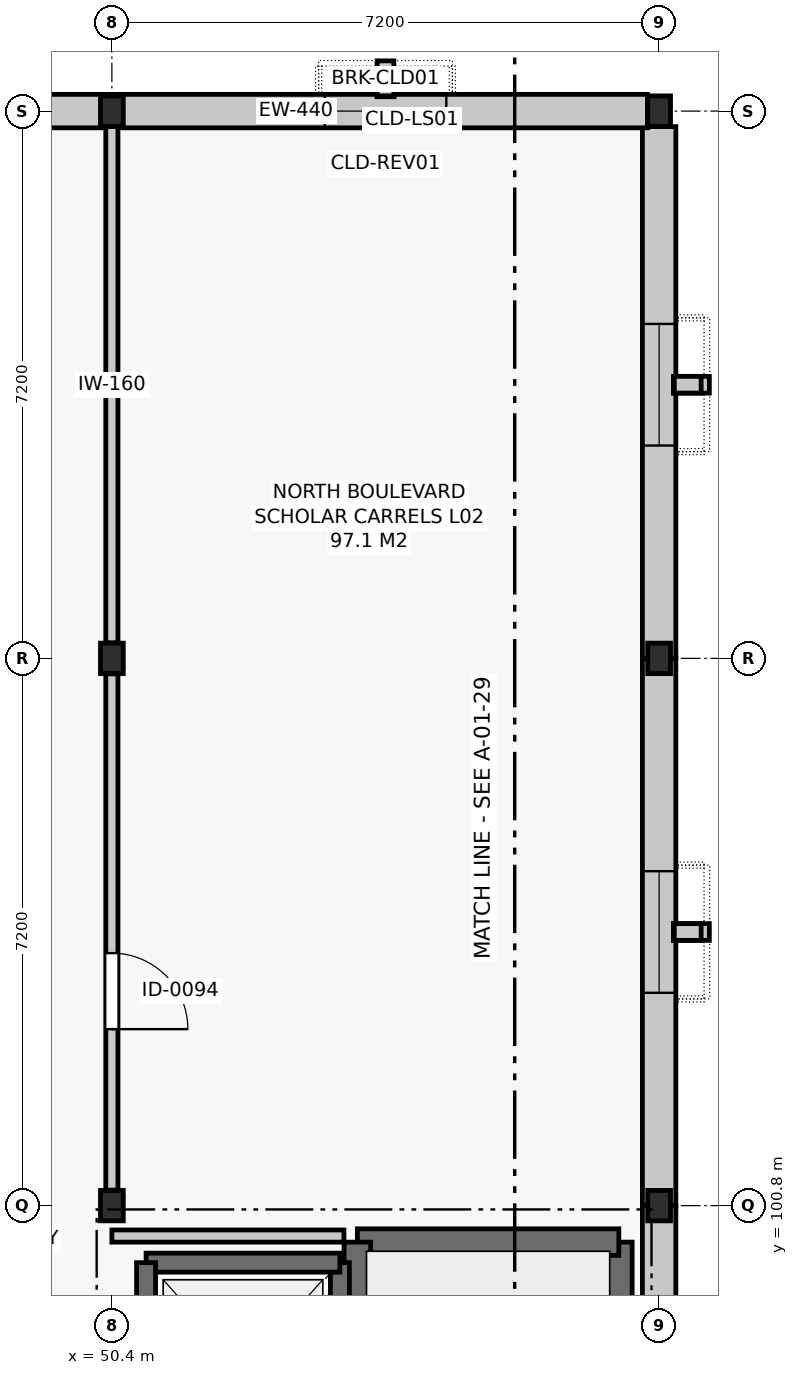
"""IFC4 building model, lengths in metres.
Left out: names, types, materials, properties, quantities, classifications, styles, units other than length and angle.
Written with IfcOpenShell. Run it as: python <this file> out.ifc"""

import sys

from ifc_helpers import new_model, si_unit, direction, frame, frame_2d, origin, origin_2d, place, context, subcontext, project, spatial, rectangle, i_section, extrude, element, fill, save


model = new_model("IFC4")
c1 = context("Model", 3, precision=1e-05, world=origin(), true_north=direction((0.0, 1.0)))
c2 = subcontext(c1, "Body", "Model", "MODEL_VIEW")
j1 = project(units=[si_unit("LENGTHUNIT", "METRE"), si_unit("PLANEANGLEUNIT", "RADIAN")], contexts=[c1])
p1 = place(None, origin())
s1 = spatial("IfcSite", under=j1, at=p1, CompositionType="ELEMENT")
p2 = place(p1, origin())
s2 = spatial("IfcBuilding", under=s1, at=p2, CompositionType="ELEMENT")
p3 = place(p2, frame((0.0, 0.0, 10.2)))
s3 = spatial("IfcBuildingStorey", under=s2, at=p3, CompositionType="ELEMENT", Elevation=10.2)
for number, where, z_axis, x_axis in (
    (1, (50.4, 100.8, 0.0), (0.0, 0.0, 1.0), (1.0, 0.0, 0.0)),
    (2, (50.4, 108.0, 0.0), (0.0, 0.0, 1.0), (1.0, 0.0, 0.0)),
    (3, (50.4, 115.2, 0.0), (0.0, 0.0, 1.0), (1.0, 0.0, 0.0)),
    (4, (57.6, 100.8, 0.0), (0.0, 0.0, 1.0), (1.0, 0.0, 0.0)),
    (5, (57.6, 108.0, 0.0), (0.0, 0.0, 1.0), (1.0, 0.0, 0.0)),
    (6, (57.6, 115.2, 0.0), (0.0, 0.0, 1.0), (1.0, 0.0, 0.0)),
):
    element("IfcColumn", number, at=place(p3, frame(where, z_axis=z_axis, x_axis=x_axis)), inside=s3, PredefinedType="COLUMN", context=c2, shape_type="SweptSolid", body=[
        extrude(i_section(OverallWidth=0.3, OverallDepth=0.4, WebThickness=0.013, FlangeThickness=0.024, FilletRadius=0.027, at=origin_2d()), origin(), (0.0, 0.0, 1.0), 4.2),
    ])
p4 = place(p3, frame((57.6, 93.6, 0.0), z_axis=(0.0, 0.0, 1.0), x_axis=(0.0, 1.0, 0.0)))
e7 = element("IfcWall", 7, at=p4, inside=s3, PredefinedType="SOLIDWALL", context=c2, shape_type="SweptSolid", body=[
    extrude(rectangle(XDim=7.2, YDim=0.44, at=frame_2d((3.6, 0.0))), origin(), (0.0, 0.0, 1.0), 3.2),
])
p5 = place(p4, frame((2.8, 0.0, 0.92)))
e8 = element("IfcOpeningElement", 8, at=p5, cuts=e7, PredefinedType="OPENING", context=c2, shape_type="SweptSolid", body=[
    extrude(rectangle(XDim=1.6, YDim=2.2, at=frame_2d((0.8, 1.1))), frame((0.0, 0.232, 0.0), z_axis=(0.0, -1.0, 0.0), x_axis=(1.0, 0.0, 0.0)), (0.0, 0.0, 1.0), 0.464),
])
p6 = place(p3, frame((57.6, 100.8, 0.0), z_axis=(0.0, 0.0, 1.0), x_axis=(0.0, 1.0, 0.0)))
e9 = element("IfcWall", 9, at=p6, inside=s3, PredefinedType="SOLIDWALL", context=c2, shape_type="SweptSolid", body=[
    extrude(rectangle(XDim=7.2, YDim=0.44, at=frame_2d((3.6, 0.0))), origin(), (0.0, 0.0, 1.0), 3.2),
])
p7 = place(p6, frame((2.8, 0.0, 0.92)))
e10 = element("IfcOpeningElement", 10, at=p7, cuts=e9, PredefinedType="OPENING", context=c2, shape_type="SweptSolid", body=[
    extrude(rectangle(XDim=1.6, YDim=2.2, at=frame_2d((0.8, 1.1))), frame((0.0, 0.232, 0.0), z_axis=(0.0, -1.0, 0.0), x_axis=(1.0, 0.0, 0.0)), (0.0, 0.0, 1.0), 0.464),
])
p8 = place(p3, frame((57.6, 108.0, 0.0), z_axis=(0.0, 0.0, 1.0), x_axis=(0.0, 1.0, 0.0)))
e11 = element("IfcWall", 11, at=p8, inside=s3, PredefinedType="SOLIDWALL", context=c2, shape_type="SweptSolid", body=[
    extrude(rectangle(XDim=6.996, YDim=0.44, at=frame_2d((3.498, 0.0))), origin(), (0.0, 0.0, 1.0), 3.2),
])
p9 = place(p8, frame((2.8, 0.0, 0.92)))
e12 = element("IfcOpeningElement", 12, at=p9, cuts=e11, PredefinedType="OPENING", context=c2, shape_type="SweptSolid", body=[
    extrude(rectangle(XDim=1.6, YDim=2.2, at=frame_2d((0.8, 1.1))), frame((0.0, 0.232, 0.0), z_axis=(0.0, -1.0, 0.0), x_axis=(1.0, 0.0, 0.0)), (0.0, 0.0, 1.0), 0.464),
])
p10 = place(p3, frame((57.446, 115.2, 0.0), z_axis=(0.0, 0.0, 1.0), x_axis=(-1.0, 0.0, 0.0)))
e13 = element("IfcWall", 13, at=p10, inside=s3, PredefinedType="SOLIDWALL", context=c2, shape_type="SweptSolid", body=[
    extrude(rectangle(XDim=7.046, YDim=0.44, at=frame_2d((3.523, 0.0))), origin(), (0.0, 0.0, 1.0), 3.2),
])
p11 = place(p10, frame((2.646, 0.0, 0.92)))
e14 = element("IfcOpeningElement", 14, at=p11, cuts=e13, PredefinedType="OPENING", context=c2, shape_type="SweptSolid", body=[
    extrude(rectangle(XDim=1.6, YDim=2.2, at=frame_2d((0.8, 1.1))), frame((0.0, 0.232, 0.0), z_axis=(0.0, -1.0, 0.0), x_axis=(1.0, 0.0, 0.0)), (0.0, 0.0, 1.0), 0.464),
])
p12 = place(p3, frame((50.4, 115.2, 0.0), z_axis=(0.0, 0.0, 1.0), x_axis=(-1.0, 0.0, 0.0)))
e15 = element("IfcWall", 15, at=p12, inside=s3, PredefinedType="SOLIDWALL", context=c2, shape_type="SweptSolid", body=[
    extrude(rectangle(XDim=7.2, YDim=0.44, at=frame_2d((3.6, 0.0))), origin(), (0.0, 0.0, 1.0), 3.2),
])
p13 = place(p3, frame((57.07, 93.18, 0.0), z_axis=(0.0, 0.0, 1.0), x_axis=(0.0, 1.0, 0.0)))
e16 = element("IfcWall", 16, at=p13, inside=s3, PredefinedType="SHEAR", context=c2, shape_type="SweptSolid", body=[
    extrude(rectangle(XDim=7.14, YDim=0.35, at=frame_2d((3.57, 0.0))), origin(), (0.0, 0.0, 1.0), 3.92),
])
p14 = place(p3, frame((57.07, 100.32, 0.0), z_axis=(0.0, 0.0, 1.0), x_axis=(-1.0, 0.0, 0.0)))
e17 = element("IfcWall", 17, at=p14, inside=s3, PredefinedType="SHEAR", context=c2, shape_type="SweptSolid", body=[
    extrude(rectangle(XDim=3.44, YDim=0.35, at=frame_2d((1.72, 0.0))), origin(), (0.0, 0.0, 1.0), 3.92),
])
p15 = place(p3, frame((53.63, 100.32, 0.0), z_axis=(0.0, 0.0, 1.0), x_axis=(0.0, -1.0, 0.0)))
e18 = element("IfcWall", 18, at=p15, inside=s3, PredefinedType="SHEAR", context=c2, shape_type="SweptSolid", body=[
    extrude(rectangle(XDim=7.14, YDim=0.35, at=frame_2d((3.57, 0.0))), origin(), (0.0, 0.0, 1.0), 3.92),
])
p16 = place(p3, frame((53.4, 97.25, 0.0), z_axis=(0.0, 0.0, 1.0), x_axis=(0.0, 1.0, 0.0)))
e19 = element("IfcWall", 19, at=p16, inside=s3, PredefinedType="SHEAR", context=c2, shape_type="SweptSolid", body=[
    extrude(rectangle(XDim=2.8, YDim=0.25, at=frame_2d((1.4, 0.0))), origin(), (0.0, 0.0, 1.0), 3.92),
])
p17 = place(p3, frame((53.4, 100.05, 0.0), z_axis=(0.0, 0.0, 1.0), x_axis=(-1.0, 0.0, 0.0)))
e20 = element("IfcWall", 20, at=p17, inside=s3, PredefinedType="SHEAR", context=c2, shape_type="SweptSolid", body=[
    extrude(rectangle(XDim=2.55, YDim=0.25, at=frame_2d((1.275, 0.0))), origin(), (0.0, 0.0, 1.0), 3.92),
])
p18 = place(p3, frame((50.85, 100.05, 0.0), z_axis=(0.0, 0.0, 1.0), x_axis=(0.0, -1.0, 0.0)))
e21 = element("IfcWall", 21, at=p18, inside=s3, PredefinedType="SHEAR", context=c2, shape_type="SweptSolid", body=[
    extrude(rectangle(XDim=2.8, YDim=0.25, at=frame_2d((1.4, 0.0))), origin(), (0.0, 0.0, 1.0), 3.92),
])
p19 = place(p3, frame((50.4, 100.4, 0.0), z_axis=(0.0, 0.0, 1.0), x_axis=(1.0, 0.0, 0.0)))
e22 = element("IfcWall", 22, at=p19, inside=s3, PredefinedType="PARTITIONING", context=c2, shape_type="SweptSolid", body=[
    extrude(rectangle(XDim=3.053, YDim=0.16, at=frame_2d((1.526, 0.0))), origin(), (0.0, 0.0, 1.0), 3.555),
])
p20 = place(p3, frame((50.4, 101.004, 0.0), z_axis=(0.0, 0.0, 1.0), x_axis=(0.0, 1.0, 0.0)))
e23 = element("IfcWall", 23, at=p20, inside=s3, PredefinedType="PARTITIONING", context=c2, shape_type="SweptSolid", body=[
    extrude(rectangle(XDim=6.792, YDim=0.16, at=frame_2d((3.396, 0.0))), origin(), (0.0, 0.0, 1.0), 3.555),
])
p21 = place(p20, frame((2.118, 0.0, 0.0)))
e24 = element("IfcOpeningElement", 24, at=p21, cuts=e23, PredefinedType="OPENING", context=c2, shape_type="SweptSolid", body=[
    extrude(rectangle(XDim=1.0, YDim=2.15, at=frame_2d((0.5, 1.075))), frame((0.0, 0.092, 0.0), z_axis=(0.0, -1.0, 0.0), x_axis=(1.0, 0.0, 0.0)), (0.0, 0.0, 1.0), 0.184),
])
p22 = place(p3, frame((50.4, 108.204, 0.0), z_axis=(0.0, 0.0, 1.0), x_axis=(0.0, 1.0, 0.0)))
e25 = element("IfcWall", 25, at=p22, inside=s3, PredefinedType="PARTITIONING", context=c2, shape_type="SweptSolid", body=[
    extrude(rectangle(XDim=6.792, YDim=0.16, at=frame_2d((3.396, 0.0))), origin(), (0.0, 0.0, 1.0), 3.555),
])
p23 = place(p7, origin())
e26 = element("IfcWindow", 26, at=p23, inside=s3, PartitioningType="SINGLE_PANEL", PredefinedType="WINDOW", context=c2, shape_type="SweptSolid", body=[
    extrude(rectangle(XDim=1.6, YDim=2.2, at=frame_2d((0.8, 1.1))), frame((0.0, 0.03, 0.0), z_axis=(0.0, -1.0, 0.0), x_axis=(1.0, 0.0, 0.0)), (0.0, 0.0, 1.0), 0.06),
])
fill(e10, e26)
p24 = place(p9, origin())
e27 = element("IfcWindow", 27, at=p24, inside=s3, PartitioningType="SINGLE_PANEL", PredefinedType="WINDOW", context=c2, shape_type="SweptSolid", body=[
    extrude(rectangle(XDim=1.6, YDim=2.2, at=frame_2d((0.8, 1.1))), frame((0.0, 0.03, 0.0), z_axis=(0.0, -1.0, 0.0), x_axis=(1.0, 0.0, 0.0)), (0.0, 0.0, 1.0), 0.06),
])
fill(e12, e27)
p25 = place(p11, origin())
e28 = element("IfcWindow", 28, at=p25, inside=s3, PartitioningType="SINGLE_PANEL", PredefinedType="WINDOW", context=c2, shape_type="SweptSolid", body=[
    extrude(rectangle(XDim=1.6, YDim=2.2, at=frame_2d((0.8, 1.1))), frame((0.0, 0.03, 0.0), z_axis=(0.0, -1.0, 0.0), x_axis=(1.0, 0.0, 0.0)), (0.0, 0.0, 1.0), 0.06),
])
fill(e14, e28)
p26 = place(p21, frame((1.0, 0.0, 0.0), z_axis=(0.0, 0.0, 1.0), x_axis=(-1.0, 0.0, 0.0)))
e29 = element("IfcDoor", 29, at=p26, inside=s3, OperationType="SINGLE_SWING_RIGHT", PredefinedType="DOOR", context=c2, shape_type="SweptSolid", body=[
    extrude(rectangle(XDim=1.0, YDim=2.15, at=frame_2d((0.5, 1.075))), frame((0.0, 0.025, 0.0), z_axis=(0.0, -1.0, 0.0), x_axis=(1.0, 0.0, 0.0)), (0.0, 0.0, 1.0), 0.05),
])
fill(e24, e29)
save(model, sys.argv[1])
